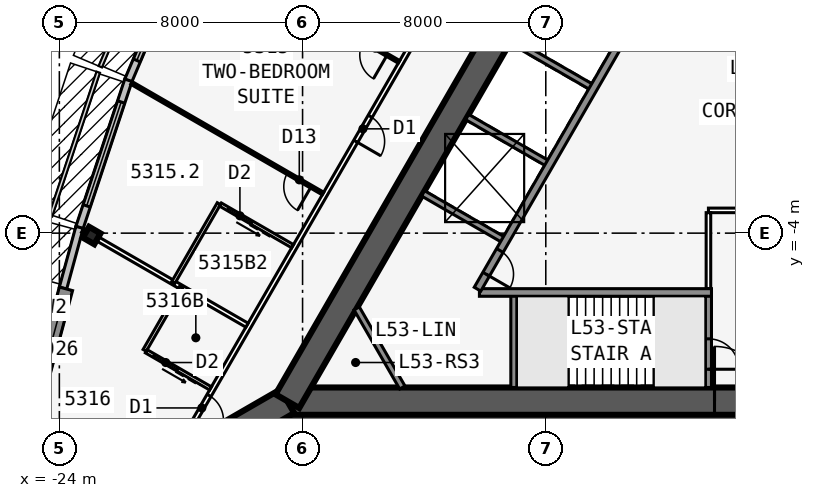
"""IFC4 building model, lengths in metres.
Left out: names, types, materials, properties, quantities, classifications, styles, units other than length and angle.
Written with IfcOpenShell. Run it as: python <this file> out.ifc"""

import sys

from ifc_helpers import new_model, si_unit, direction, frame, frame_2d, origin, origin_2d, place, context, subcontext, project, spatial, polyline, rectangle, i_section, outline, extrude, element, fill, save


model = new_model("IFC4")
c1 = context("Model", 3, precision=1e-05, world=origin(), true_north=direction((0.0, 1.0)))
c2 = subcontext(c1, "Body", "Model", "MODEL_VIEW")
j1 = project(units=[si_unit("LENGTHUNIT", "METRE"), si_unit("PLANEANGLEUNIT", "RADIAN")], contexts=[c1])
p1 = place(None, origin())
s1 = spatial("IfcSite", under=j1, at=p1, CompositionType="ELEMENT")
p2 = place(p1, origin())
s2 = spatial("IfcBuilding", under=s1, at=p2, CompositionType="ELEMENT")
p3 = place(p2, frame((0.0, 0.0, 200.9)))
s3 = spatial("IfcBuildingStorey", under=s2, at=p3, CompositionType="ELEMENT", Elevation=200.9)
p4 = place(p3, frame((-16.5, -9.526, 0.0), z_axis=(0.0, 0.0, 1.0), x_axis=(1.0, 0.0, 0.0)))
e1 = element("IfcWall", 1, at=p4, inside=s3, PredefinedType="SHEAR", context=c2, shape_type="SweptSolid", body=[
    extrude(rectangle(XDim=33.0, YDim=0.9, at=frame_2d((16.5, 0.0))), origin(), (0.0, 0.0, 1.0), 3.6),
])
p5 = place(p4, frame((14.05, 0.0, 0.0)))
e2 = element("IfcOpeningElement", 2, at=p5, cuts=e1, PredefinedType="OPENING", context=c2, shape_type="SweptSolid", body=[
    extrude(rectangle(XDim=1.8, YDim=2.13, at=frame_2d((0.9, 1.065))), frame((0.0, 0.46, 0.0), z_axis=(0.0, -1.0, 0.0), x_axis=(1.0, 0.0, 0.0)), (0.0, 0.0, 1.0), 0.92),
])
p6 = place(p3, frame((-10.183, -5.951, 0.0), z_axis=(0.0, 0.0, 1.0), x_axis=(1.0, 0.0, 0.0)))
e3 = element("IfcWall", 3, at=p6, inside=s3, PredefinedType="SOLIDWALL", context=c2, shape_type="SweptSolid", body=[
    extrude(rectangle(XDim=7.633, YDim=0.25, at=frame_2d((3.816, 0.0))), origin(), (0.0, 0.0, 1.0), 3.435),
])
p7 = place(p3, frame((-9.05, -5.951, 0.0), z_axis=(0.0, 0.0, 1.0), x_axis=(0.0, -1.0, 0.0)))
e4 = element("IfcWall", 4, at=p7, inside=s3, PredefinedType="SOLIDWALL", context=c2, shape_type="SweptSolid", body=[
    extrude(rectangle(XDim=3.125, YDim=0.2, at=frame_2d((1.562, 0.0))), origin(), (0.0, 0.0, 1.0), 3.435),
])
p8 = place(p3, frame((-2.65, -5.951, 0.0), z_axis=(0.0, 0.0, 1.0), x_axis=(0.0, -1.0, 0.0)))
e5 = element("IfcWall", 5, at=p8, inside=s3, PredefinedType="SOLIDWALL", context=c2, shape_type="SweptSolid", body=[
    extrude(rectangle(XDim=3.125, YDim=0.2, at=frame_2d((1.562, 0.0))), origin(), (0.0, 0.0, 1.0), 3.435),
])
p9 = place(p8, frame((1.525, 0.0, 0.0)))
e6 = element("IfcOpeningElement", 6, at=p9, cuts=e5, PredefinedType="OPENING", context=c2, shape_type="SweptSolid", body=[
    extrude(rectangle(XDim=1.0, YDim=2.13, at=frame_2d((0.5, 1.065))), frame((0.0, 0.11, 0.0), z_axis=(0.0, -1.0, 0.0), x_axis=(1.0, 0.0, 0.0)), (0.0, 0.0, 1.0), 0.22),
])
p10 = place(p3, frame((0.0, 19.052, 0.0), z_axis=(0.0, 0.0, 1.0), x_axis=(-0.499999749417, -0.866025548458, 0.0)))
e7 = element("IfcWall", 7, at=p10, inside=s3, PredefinedType="SHEAR", context=c2, shape_type="SweptSolid", body=[
    extrude(rectangle(XDim=33.0, YDim=0.9, at=frame_2d((16.5, 0.0))), origin(), (0.0, 0.0, 1.0), 3.6),
])
p11 = place(p10, frame((14.15, 0.0, 0.0)))
e8 = element("IfcOpeningElement", 8, at=p11, cuts=e7, PredefinedType="OPENING", context=c2, shape_type="SweptSolid", body=[
    extrude(rectangle(XDim=1.8, YDim=2.13, at=frame_2d((0.9, 1.065))), frame((0.0, 0.46, 0.0), z_axis=(0.0, -1.0, 0.0), x_axis=(1.0, 0.0, 0.0)), (0.0, 0.0, 1.0), 0.92),
])
p12 = place(p10, frame((12.6, 0.0, 0.0)))
e9 = element("IfcOpeningElement", 9, at=p12, cuts=e7, PredefinedType="OPENING", context=c2, shape_type="SweptSolid", body=[
    extrude(rectangle(XDim=1.0, YDim=2.13, at=frame_2d((0.5, 1.065))), frame((0.0, 0.46, 0.0), z_axis=(0.0, -1.0, 0.0), x_axis=(1.0, 0.0, 0.0)), (0.0, 0.0, 1.0), 0.92),
])
p13 = place(p3, frame((-4.929, 3.365, 0.0), z_axis=(0.0, 0.0, 1.0), x_axis=(-0.499991433582, -0.866030349552, 0.0)))
e10 = element("IfcWall", 10, at=p13, inside=s3, PredefinedType="SOLIDWALL", context=c2, shape_type="SweptSolid", body=[
    extrude(rectangle(XDim=10.633, YDim=0.25, at=frame_2d((5.316, 0.0))), origin(), (0.0, 0.0, 1.0), 3.435),
])
p14 = place(p13, frame((9.164, 0.0, 0.0)))
e11 = element("IfcOpeningElement", 11, at=p14, cuts=e10, PredefinedType="OPENING", context=c2, shape_type="SweptSolid", body=[
    extrude(rectangle(XDim=0.9, YDim=2.13, at=frame_2d((0.45, 1.065))), frame((0.0, 0.135, 0.0), z_axis=(0.0, -1.0, 0.0), x_axis=(1.0, 0.0, 0.0)), (0.0, 0.0, 1.0), 0.27),
])
for number, where, z_axis, x_axis in (
    (12, (-6.429, 0.767, 0.0), (0.0, 0.0, 1.0), (-0.866, 0.5, 0.0)),
    (13, (-7.879, -1.744, 0.0), (0.0, 0.0, 1.0), (-0.866, 0.5, 0.0)),
    (14, (-9.329, -4.256, 0.0), (0.0, 0.0, 1.0), (-0.866, 0.5, 0.0)),
):
    element("IfcWall", number, at=place(p3, frame(where, z_axis=z_axis, x_axis=x_axis)), inside=s3, PredefinedType="SOLIDWALL", context=c2, shape_type="SweptSolid", body=[
        extrude(rectangle(XDim=3.125, YDim=0.2, at=frame_2d((1.562, 0.0))), origin(), (0.0, 0.0, 1.0), 3.435),
    ])
p15 = place(p3, frame((-16.5, -9.526, 0.0), z_axis=(0.0, 0.0, 1.0), x_axis=(-0.866031398331, -0.499989616998, 0.0)))
e15 = element("IfcWall", 15, at=p15, inside=s3, PredefinedType="SHEAR", context=c2, shape_type="SweptSolid", body=[
    extrude(rectangle(XDim=4.746, YDim=0.9, at=frame_2d((2.373, 0.0))), origin(), (0.0, 0.0, 1.0), 3.6),
])
p16 = place(p15, frame((1.8, 0.0, 0.0)))
e16 = element("IfcOpeningElement", 16, at=p16, cuts=e15, PredefinedType="OPENING", context=c2, shape_type="SweptSolid", body=[
    extrude(rectangle(XDim=1.8, YDim=2.13, at=frame_2d((0.9, 1.065))), frame((0.0, 0.46, 0.0), z_axis=(0.0, -1.0, 0.0), x_axis=(1.0, 0.0, 0.0)), (0.0, 0.0, 1.0), 0.92),
])
p17 = place(p3, frame((-22.937, -4.078, 0.0), z_axis=(0.0, 0.0, 1.0), x_axis=(-0.5, -0.866025403784, 0.0)))
e17 = element("IfcColumn", 17, at=p17, inside=s3, PredefinedType="COLUMN", context=c2, shape_type="SweptSolid", body=[
    extrude(i_section(OverallWidth=0.411, OverallDepth=0.434, WebThickness=0.036, FlangeThickness=0.057, at=origin_2d()), origin(), (0.0, 0.0, 1.0), 3.6),
])
p18 = place(p3, frame((-19.768, 5.657, 0.0), z_axis=(0.0, 0.0, 1.0), x_axis=(-0.390096809471, -0.920773848044, 0.0)))
e18 = element("IfcWall", 18, at=p18, inside=s3, PredefinedType="STANDARD", context=c2, shape_type="SweptSolid", body=[
    extrude(rectangle(XDim=5.038, YDim=0.25, at=frame_2d((2.519, 0.0))), origin(), (0.0, 0.0, 1.0), 3.435),
])
p19 = place(p18, frame((0.719, 0.0, 0.45)))
e19 = element("IfcOpeningElement", 19, at=p19, cuts=e18, PredefinedType="OPENING", context=c2, shape_type="SweptSolid", body=[
    extrude(rectangle(XDim=3.6, YDim=2.6, at=frame_2d((1.8, 1.3))), frame((0.0, 0.135, 0.0), z_axis=(0.0, -1.0, 0.0), x_axis=(1.0, 0.0, 0.0)), (0.0, 0.0, 1.0), 0.27),
])
p20 = place(p3, frame((-21.729, 1.028, 0.0), z_axis=(0.0, 0.0, 1.0), x_axis=(-0.315108478109, -0.949055660656, 0.0)))
e20 = element("IfcWall", 20, at=p20, inside=s3, PredefinedType="STANDARD", context=c2, shape_type="SweptSolid", body=[
    extrude(rectangle(XDim=5.105, YDim=0.25, at=frame_2d((2.552, 0.0))), origin(), (0.0, 0.0, 1.0), 3.435),
])
p21 = place(p20, frame((0.752, 0.0, 0.45)))
e21 = element("IfcOpeningElement", 21, at=p21, cuts=e20, PredefinedType="OPENING", context=c2, shape_type="SweptSolid", body=[
    extrude(rectangle(XDim=3.6, YDim=2.6, at=frame_2d((1.8, 1.3))), frame((0.0, 0.135, 0.0), z_axis=(0.0, -1.0, 0.0), x_axis=(1.0, 0.0, 0.0)), (0.0, 0.0, 1.0), 0.27),
])
p22 = place(p3, frame((-23.336, -3.811, 0.0), z_axis=(0.0, 0.0, 1.0), x_axis=(-0.262867703986, -0.964831887015, 0.0)))
e22 = element("IfcWall", 22, at=p22, inside=s3, PredefinedType="STANDARD", context=c2, shape_type="SweptSolid", body=[
    extrude(rectangle(XDim=2.068, YDim=0.25, at=frame_2d((1.034, 0.0))), origin(), (0.0, 0.0, 1.0), 3.435),
])
p23 = place(p3, frame((-23.783, -5.832, 0.0), z_axis=(0.0, 0.0, 1.0), x_axis=(-0.258784695888, -0.965935029479, 0.0)))
e23 = element("IfcWall", 23, at=p23, inside=s3, PredefinedType="SOLIDWALL", context=c2, shape_type="SweptSolid", body=[
    extrude(rectangle(XDim=4.184, YDim=0.45, at=frame_2d((2.092, 0.0))), origin(), (0.0, 0.0, 1.0), 3.435),
])
p24 = place(p23, frame((0.592, 0.0, 0.45)))
e24 = element("IfcOpeningElement", 24, at=p24, cuts=e23, PredefinedType="OPENING", context=c2, shape_type="SweptSolid", body=[
    extrude(rectangle(XDim=3.0, YDim=2.6, at=frame_2d((1.5, 1.3))), frame((0.0, 0.235, 0.0), z_axis=(0.0, -1.0, 0.0), x_axis=(1.0, 0.0, 0.0)), (0.0, 0.0, 1.0), 0.47),
])
p25 = place(p3, frame((-24.865, -9.757, 0.0), z_axis=(0.0, 0.0, 1.0), x_axis=(0.258799282522, -0.96593112144, 0.0)))
e25 = element("IfcWall", 25, at=p25, inside=s3, PredefinedType="SOLIDWALL", context=c2, shape_type="SweptSolid", body=[
    extrude(outline(polyline([(4.184, 0.225), (4.125, 0.225), (3.633, 0.093), (3.597, 0.225), (0.0, 0.225), (0.0, -0.225), (4.184, -0.225), (4.184, 0.225)])), origin(), (0.0, 0.0, 1.0), 3.435),
])
p26 = place(p25, frame((0.674, 0.0, 0.45)))
e26 = element("IfcOpeningElement", 26, at=p26, cuts=e25, PredefinedType="OPENING", context=c2, shape_type="SweptSolid", body=[
    extrude(rectangle(XDim=2.4, YDim=2.6, at=frame_2d((1.2, 1.3))), frame((0.0, 0.235, 0.0), z_axis=(0.0, -1.0, 0.0), x_axis=(1.0, 0.0, 0.0)), (0.0, 0.0, 1.0), 0.47),
])
p27 = place(p3, frame((-0.5, 22.836, 0.0), z_axis=(0.0, 0.0, 1.0), x_axis=(-0.500001677587, -0.866024435227, 0.0)))
e27 = element("IfcWall", 27, at=p27, inside=s3, PredefinedType="PARTITIONING", context=c2, shape_type="SweptSolid", body=[
    extrude(rectangle(XDim=39.054, YDim=0.15, at=frame_2d((19.527, 0.0))), origin(), (0.0, 0.0, 1.0), 3.435),
])
p28 = place(p27, frame((0.952, 0.0, 0.0)))
e28 = element("IfcOpeningElement", 28, at=p28, cuts=e27, PredefinedType="OPENING", context=c2, shape_type="SweptSolid", body=[
    extrude(rectangle(XDim=0.95, YDim=2.13, at=frame_2d((0.475, 1.065))), frame((0.0, 0.085, 0.0), z_axis=(0.0, -1.0, 0.0), x_axis=(1.0, 0.0, 0.0)), (0.0, 0.0, 1.0), 0.17),
])
p29 = place(p27, frame((7.752, 0.0, 0.0)))
e29 = element("IfcOpeningElement", 29, at=p29, cuts=e27, PredefinedType="OPENING", context=c2, shape_type="SweptSolid", body=[
    extrude(rectangle(XDim=0.95, YDim=2.13, at=frame_2d((0.475, 1.065))), frame((0.0, 0.085, 0.0), z_axis=(0.0, -1.0, 0.0), x_axis=(1.0, 0.0, 0.0)), (0.0, 0.0, 1.0), 0.17),
])
p30 = place(p27, frame((17.152, 0.0, 0.0)))
e30 = element("IfcOpeningElement", 30, at=p30, cuts=e27, PredefinedType="OPENING", context=c2, shape_type="SweptSolid", body=[
    extrude(rectangle(XDim=0.95, YDim=2.13, at=frame_2d((0.475, 1.065))), frame((0.0, 0.085, 0.0), z_axis=(0.0, -1.0, 0.0), x_axis=(1.0, 0.0, 0.0)), (0.0, 0.0, 1.0), 0.17),
])
p31 = place(p27, frame((26.552, 0.0, 0.0)))
e31 = element("IfcOpeningElement", 31, at=p31, cuts=e27, PredefinedType="OPENING", context=c2, shape_type="SweptSolid", body=[
    extrude(rectangle(XDim=0.95, YDim=2.13, at=frame_2d((0.475, 1.065))), frame((0.0, 0.085, 0.0), z_axis=(0.0, -1.0, 0.0), x_axis=(1.0, 0.0, 0.0)), (0.0, 0.0, 1.0), 0.17),
])
p32 = place(p27, frame((37.152, 0.0, 0.0)))
e32 = element("IfcOpeningElement", 32, at=p32, cuts=e27, PredefinedType="OPENING", context=c2, shape_type="SweptSolid", body=[
    extrude(rectangle(XDim=0.95, YDim=2.13, at=frame_2d((0.475, 1.065))), frame((0.0, 0.085, 0.0), z_axis=(0.0, -1.0, 0.0), x_axis=(1.0, 0.0, 0.0)), (0.0, 0.0, 1.0), 0.17),
])
p33 = place(p3, frame((-12.829, 1.633, 0.0), z_axis=(0.0, 0.0, 1.0), x_axis=(-0.866030558329, 0.49999107196, 0.0)))
e33 = element("IfcWall", 33, at=p33, inside=s3, PredefinedType="PARTITIONING", context=c2, shape_type="SweptSolid", body=[
    extrude(rectangle(XDim=7.894, YDim=0.1, at=frame_2d((3.947, 0.0))), origin(), (0.0, 0.0, 1.0), 2.589),
])
p34 = place(p33, frame((0.45, 0.0, 0.0)))
e34 = element("IfcOpeningElement", 34, at=p34, cuts=e33, PredefinedType="OPENING", context=c2, shape_type="SweptSolid", body=[
    extrude(rectangle(XDim=0.9, YDim=2.13, at=frame_2d((0.45, 1.065))), frame((0.0, 0.06, 0.0), z_axis=(0.0, -1.0, 0.0), x_axis=(1.0, 0.0, 0.0)), (0.0, 0.0, 1.0), 0.12),
])
p35 = place(p3, frame((-15.329, -2.697, 0.0), z_axis=(0.0, 0.0, 1.0), x_axis=(-0.866032413668, 0.499987858329, 0.0)))
e35 = element("IfcWall", 35, at=p35, inside=s3, PredefinedType="PARTITIONING", context=c2, shape_type="SweptSolid", body=[
    extrude(rectangle(XDim=7.273, YDim=0.1, at=frame_2d((3.636, 0.0))), origin(), (0.0, 0.0, 1.0), 2.589),
])
p36 = place(p35, frame((0.45, 0.0, 0.0)))
e36 = element("IfcOpeningElement", 36, at=p36, cuts=e35, PredefinedType="OPENING", context=c2, shape_type="SweptSolid", body=[
    extrude(rectangle(XDim=0.9, YDim=2.13, at=frame_2d((0.45, 1.065))), frame((0.0, 0.06, 0.0), z_axis=(0.0, -1.0, 0.0), x_axis=(1.0, 0.0, 0.0)), (0.0, 0.0, 1.0), 0.12),
])
p37 = place(p3, frame((-17.829, -7.027, 0.0), z_axis=(0.0, 0.0, 1.0), x_axis=(-0.866026604282, 0.499997920671, 0.0)))
e37 = element("IfcWall", 37, at=p37, inside=s3, PredefinedType="PARTITIONING", context=c2, shape_type="SweptSolid", body=[
    extrude(rectangle(XDim=6.24, YDim=0.15, at=frame_2d((3.12, 0.0))), origin(), (0.0, 0.0, 1.0), 2.589),
])
p38 = place(p3, frame((-18.753, -3.029, 0.0), z_axis=(0.0, 0.0, 1.0), x_axis=(-0.50002537861, -0.866010750942, 0.0)))
e38 = element("IfcWall", 38, at=p38, inside=s3, PredefinedType="PLUMBINGWALL", context=c2, shape_type="SweptSolid", body=[
    extrude(rectangle(XDim=3.0, YDim=0.12, at=frame_2d((1.5, 0.0))), origin(), (0.0, 0.0, 1.0), 3.435),
])
p39 = place(p3, frame((-16.329, -4.429, 0.0), z_axis=(0.0, 0.0, 1.0), x_axis=(-0.865997131366, 0.500048966069, 0.0)))
e39 = element("IfcWall", 39, at=p39, inside=s3, PredefinedType="PLUMBINGWALL", context=c2, shape_type="SweptSolid", body=[
    extrude(rectangle(XDim=2.74, YDim=0.12, at=frame_2d((1.37, 0.0))), origin(), (0.0, 0.0, 1.0), 3.435),
])
p40 = place(p39, frame((1.55, 0.0, 0.0)))
e40 = element("IfcOpeningElement", 40, at=p40, cuts=e39, PredefinedType="OPENING", context=c2, shape_type="SweptSolid", body=[
    extrude(rectangle(XDim=0.9, YDim=2.13, at=frame_2d((0.45, 1.065))), frame((0.0, 0.07, 0.0), z_axis=(0.0, -1.0, 0.0), x_axis=(1.0, 0.0, 0.0)), (0.0, 0.0, 1.0), 0.14),
])
p41 = place(p3, frame((-19.993, -5.777, 0.0), z_axis=(0.0, 0.0, 1.0), x_axis=(-0.500033551112, -0.866006032174, 0.0)))
e41 = element("IfcWall", 41, at=p41, inside=s3, PredefinedType="PLUMBINGWALL", context=c2, shape_type="SweptSolid", body=[
    extrude(rectangle(XDim=2.4, YDim=0.12, at=frame_2d((1.2, 0.0))), origin(), (0.0, 0.0, 1.0), 3.435),
])
p42 = place(p3, frame((-19.029, -9.106, 0.0), z_axis=(0.0, 0.0, 1.0), x_axis=(-0.866023955769, 0.500002508028, 0.0)))
e42 = element("IfcWall", 42, at=p42, inside=s3, PredefinedType="PLUMBINGWALL", context=c2, shape_type="SweptSolid", body=[
    extrude(rectangle(XDim=2.44, YDim=0.12, at=frame_2d((1.22, 0.0))), origin(), (0.0, 0.0, 1.0), 3.435),
])
p43 = place(p42, frame((1.25, 0.0, 0.0)))
e43 = element("IfcOpeningElement", 43, at=p43, cuts=e42, PredefinedType="OPENING", context=c2, shape_type="SweptSolid", body=[
    extrude(rectangle(XDim=0.9, YDim=2.13, at=frame_2d((0.45, 1.065))), frame((0.0, 0.07, 0.0), z_axis=(0.0, -1.0, 0.0), x_axis=(1.0, 0.0, 0.0)), (0.0, 0.0, 1.0), 0.14),
])
p44 = place(p3, frame((-2.65, -3.251, 0.0), z_axis=(0.0, 0.0, 1.0), x_axis=(1.0, 0.0, 0.0)))
e44 = element("IfcWall", 44, at=p44, inside=s3, PredefinedType="PARTITIONING", context=c2, shape_type="SweptSolid", body=[
    extrude(rectangle(XDim=8.35, YDim=0.15, at=frame_2d((4.175, 0.0))), origin(), (0.0, 0.0, 1.0), 3.435),
])
p45 = place(p3, frame((-2.65, -5.826, 0.0), z_axis=(0.0, 0.0, 1.0), x_axis=(0.0, 1.0, 0.0)))
e45 = element("IfcWall", 45, at=p45, inside=s3, PredefinedType="PARTITIONING", context=c2, shape_type="SweptSolid", body=[
    extrude(rectangle(XDim=2.5, YDim=0.15, at=frame_2d((1.25, 0.0))), origin(), (0.0, 0.0, 1.0), 3.435),
])
p46 = place(p3, frame((-12.719, -9.076, 0.0), z_axis=(0.0, 0.0, 1.0), x_axis=(-0.499952404951, 0.866052881055, 0.0)))
e46 = element("IfcWall", 46, at=p46, inside=s3, PredefinedType="SOLIDWALL", context=c2, shape_type="SweptSolid", body=[
    extrude(rectangle(XDim=3.002, YDim=0.2, at=frame_2d((1.501, 0.0))), origin(), (0.0, 0.0, 1.0), 3.435),
])
p47 = place(p3, frame((-7.247, -7.576, 0.0), z_axis=(0.0, 0.0, 1.0), x_axis=(1.0, 0.0, 0.0)))
e47 = element("IfcWall", 47, at=p47, inside=s3, PredefinedType="SOLIDWALL", context=c2, shape_type="SweptSolid", body=[
    extrude(rectangle(XDim=2.794, YDim=0.1, at=frame_2d((1.397, 0.0))), origin(), (0.0, 0.0, 1.0), 3.6),
])
p48 = place(p19, origin())
e48 = element("IfcWindow", 48, at=p48, inside=s3, PartitioningType="SINGLE_PANEL", PredefinedType="WINDOW", context=c2, shape_type="SweptSolid", body=[
    extrude(rectangle(XDim=3.6, YDim=2.6, at=frame_2d((1.8, 1.3))), frame((0.0, 0.03, 0.0), z_axis=(0.0, -1.0, 0.0), x_axis=(1.0, 0.0, 0.0)), (0.0, 0.0, 1.0), 0.06),
])
fill(e19, e48)
p49 = place(p21, origin())
e49 = element("IfcWindow", 49, at=p49, inside=s3, PartitioningType="SINGLE_PANEL", PredefinedType="WINDOW", context=c2, shape_type="SweptSolid", body=[
    extrude(rectangle(XDim=3.6, YDim=2.6, at=frame_2d((1.8, 1.3))), frame((0.0, 0.03, 0.0), z_axis=(0.0, -1.0, 0.0), x_axis=(1.0, 0.0, 0.0)), (0.0, 0.0, 1.0), 0.06),
])
fill(e21, e49)
p50 = place(p24, origin())
e50 = element("IfcWindow", 50, at=p50, inside=s3, PartitioningType="SINGLE_PANEL", PredefinedType="WINDOW", context=c2, shape_type="SweptSolid", body=[
    extrude(rectangle(XDim=3.0, YDim=2.6, at=frame_2d((1.5, 1.3))), frame((0.0, 0.03, 0.0), z_axis=(0.0, -1.0, 0.0), x_axis=(1.0, 0.0, 0.0)), (0.0, 0.0, 1.0), 0.06),
])
fill(e24, e50)
p51 = place(p34, origin())
e51 = element("IfcDoor", 51, at=p51, inside=s3, OperationType="SINGLE_SWING_LEFT", PredefinedType="DOOR", context=c2, shape_type="SweptSolid", body=[
    extrude(rectangle(XDim=0.9, YDim=2.13, at=frame_2d((0.45, 1.065))), frame((0.0, 0.025, 0.0), z_axis=(0.0, -1.0, 0.0), x_axis=(1.0, 0.0, 0.0)), (0.0, 0.0, 1.0), 0.05),
])
fill(e34, e51)
p52 = place(p36, origin())
e52 = element("IfcDoor", 52, at=p52, inside=s3, OperationType="SINGLE_SWING_LEFT", PredefinedType="DOOR", context=c2, shape_type="SweptSolid", body=[
    extrude(rectangle(XDim=0.9, YDim=2.13, at=frame_2d((0.45, 1.065))), frame((0.0, 0.025, 0.0), z_axis=(0.0, -1.0, 0.0), x_axis=(1.0, 0.0, 0.0)), (0.0, 0.0, 1.0), 0.05),
])
fill(e36, e52)
p53 = place(p31, origin())
e53 = element("IfcDoor", 53, at=p53, inside=s3, OperationType="SINGLE_SWING_RIGHT", PredefinedType="DOOR", context=c2, shape_type="SweptSolid", body=[
    extrude(rectangle(XDim=0.95, YDim=2.13, at=frame_2d((0.475, 1.065))), frame((0.0, 0.025, 0.0), z_axis=(0.0, -1.0, 0.0), x_axis=(1.0, 0.0, 0.0)), (0.0, 0.0, 1.0), 0.05),
])
fill(e31, e53)
p54 = place(p40, origin())
e54 = element("IfcDoor", 54, at=p54, inside=s3, OperationType="SLIDING_TO_LEFT", PredefinedType="DOOR", context=c2, shape_type="SweptSolid", body=[
    extrude(rectangle(XDim=0.9, YDim=2.13, at=frame_2d((0.45, 1.065))), frame((0.0, 0.025, 0.0), z_axis=(0.0, -1.0, 0.0), x_axis=(1.0, 0.0, 0.0)), (0.0, 0.0, 1.0), 0.05),
])
fill(e40, e54)
p55 = place(p43, origin())
e55 = element("IfcDoor", 55, at=p55, inside=s3, OperationType="SLIDING_TO_LEFT", PredefinedType="DOOR", context=c2, shape_type="SweptSolid", body=[
    extrude(rectangle(XDim=0.9, YDim=2.13, at=frame_2d((0.45, 1.065))), frame((0.0, 0.025, 0.0), z_axis=(0.0, -1.0, 0.0), x_axis=(1.0, 0.0, 0.0)), (0.0, 0.0, 1.0), 0.05),
])
fill(e43, e55)
p56 = place(p32, origin())
e56 = element("IfcDoor", 56, at=p56, inside=s3, OperationType="SINGLE_SWING_RIGHT", PredefinedType="DOOR", context=c2, shape_type="SweptSolid", body=[
    extrude(rectangle(XDim=0.95, YDim=2.13, at=frame_2d((0.475, 1.065))), frame((0.0, 0.025, 0.0), z_axis=(0.0, -1.0, 0.0), x_axis=(1.0, 0.0, 0.0)), (0.0, 0.0, 1.0), 0.05),
])
fill(e32, e56)
p57 = place(p5, origin())
e57 = element("IfcDoor", 57, at=p57, inside=s3, OperationType="DOUBLE_DOOR_SINGLE_SWING", PredefinedType="DOOR", context=c2, shape_type="SweptSolid", body=[
    extrude(rectangle(XDim=1.8, YDim=2.13, at=frame_2d((0.9, 1.065))), frame((0.0, 0.025, 0.0), z_axis=(0.0, -1.0, 0.0), x_axis=(1.0, 0.0, 0.0)), (0.0, 0.0, 1.0), 0.05),
])
fill(e2, e57)
p58 = place(p9, origin())
e58 = element("IfcDoor", 58, at=p58, inside=s3, OperationType="SINGLE_SWING_RIGHT", PredefinedType="DOOR", context=c2, shape_type="SweptSolid", body=[
    extrude(rectangle(XDim=1.0, YDim=2.13, at=frame_2d((0.5, 1.065))), frame((0.0, 0.025, 0.0), z_axis=(0.0, -1.0, 0.0), x_axis=(1.0, 0.0, 0.0)), (0.0, 0.0, 1.0), 0.05),
])
fill(e6, e58)
p59 = place(p14, origin())
e59 = element("IfcDoor", 59, at=p59, inside=s3, OperationType="SINGLE_SWING_RIGHT", PredefinedType="DOOR", context=c2, shape_type="SweptSolid", body=[
    extrude(rectangle(XDim=0.9, YDim=2.13, at=frame_2d((0.45, 1.065))), frame((0.0, 0.025, 0.0), z_axis=(0.0, -1.0, 0.0), x_axis=(1.0, 0.0, 0.0)), (0.0, 0.0, 1.0), 0.05),
])
fill(e11, e59)
save(model, sys.argv[1])
